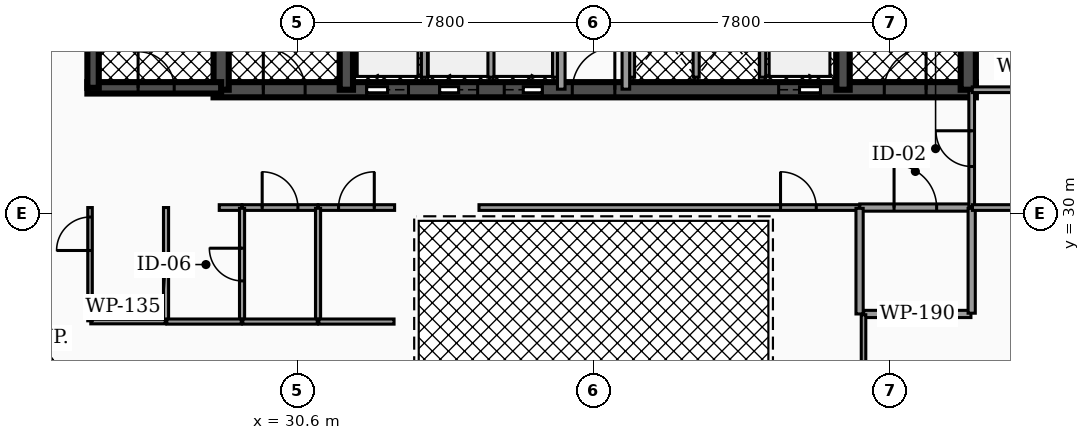
"""IFC4 building model, lengths in metres.
Left out: names, types, materials, properties, quantities, classifications, styles, units other than length and angle.
Written with IfcOpenShell. Run it as: python <this file> out.ifc"""

import sys

from ifc_helpers import new_model, si_unit, direction, frame, frame_2d, origin, place, context, subcontext, project, spatial, rectangle, extrude, element, fill, save


model = new_model("IFC4")
c1 = context("Model", 3, precision=1e-05, world=origin(), true_north=direction((0.0, 1.0)))
c2 = subcontext(c1, "Body", "Model", "MODEL_VIEW")
j1 = project(units=[si_unit("LENGTHUNIT", "METRE"), si_unit("PLANEANGLEUNIT", "RADIAN")], contexts=[c1])
p1 = place(None, origin())
s1 = spatial("IfcSite", under=j1, at=p1, CompositionType="ELEMENT")
p2 = place(p1, origin())
s2 = spatial("IfcBuilding", under=s1, at=p2, CompositionType="ELEMENT")
p3 = place(p2, frame((0.0, 0.0, 157.08)))
s3 = spatial("IfcBuildingStorey", under=s2, at=p3, CompositionType="ELEMENT", Elevation=157.08)
p4 = place(p3, frame((28.4, 33.25, 0.0), z_axis=(0.0, 0.0, 1.0), x_axis=(1.0, 0.0, 0.0)))
e1 = element("IfcWall", 1, at=p4, inside=s3, PredefinedType="SHEAR", context=c2, shape_type="SweptSolid", body=[
    extrude(rectangle(XDim=20.06, YDim=0.4, at=frame_2d((10.03, 0.0))), origin(), (0.0, 0.0, 1.0), 3.5),
])
p5 = place(p4, frame((4.03, 0.0, 0.0)))
e2 = element("IfcOpeningElement", 2, at=p5, cuts=e1, PredefinedType="OPENING", context=c2, shape_type="SweptSolid", body=[
    extrude(rectangle(XDim=1.1, YDim=2.15, at=frame_2d((0.55, 1.075))), frame((0.0, 0.21, 0.0), z_axis=(0.0, -1.0, 0.0), x_axis=(1.0, 0.0, 0.0)), (0.0, 0.0, 1.0), 0.42),
])
p6 = place(p4, frame((14.87, 0.0, 0.0)))
e3 = element("IfcOpeningElement", 3, at=p6, cuts=e1, PredefinedType="OPENING", context=c2, shape_type="SweptSolid", body=[
    extrude(rectangle(XDim=1.1, YDim=2.15, at=frame_2d((0.55, 1.075))), frame((0.0, 0.21, 0.0), z_axis=(0.0, -1.0, 0.0), x_axis=(1.0, 0.0, 0.0)), (0.0, 0.0, 1.0), 0.42),
])
p7 = place(p4, frame((5.95, 0.0, 0.0)))
e4 = element("IfcOpeningElement", 4, at=p7, cuts=e1, PredefinedType="OPENING", context=c2, shape_type="SweptSolid", body=[
    extrude(rectangle(XDim=1.0, YDim=2.1, at=frame_2d((0.5, 1.05))), frame((0.0, 0.21, 0.0), z_axis=(0.0, -1.0, 0.0), x_axis=(1.0, 0.0, 0.0)), (0.0, 0.0, 1.0), 0.42),
])
p8 = place(p4, frame((7.65, 0.0, 0.0)))
e5 = element("IfcOpeningElement", 5, at=p8, cuts=e1, PredefinedType="OPENING", context=c2, shape_type="SweptSolid", body=[
    extrude(rectangle(XDim=1.0, YDim=2.1, at=frame_2d((0.5, 1.05))), frame((0.0, 0.21, 0.0), z_axis=(0.0, -1.0, 0.0), x_axis=(1.0, 0.0, 0.0)), (0.0, 0.0, 1.0), 0.42),
])
p9 = place(p4, frame((1.31, 0.0, 0.0)))
e6 = element("IfcOpeningElement", 6, at=p9, cuts=e1, PredefinedType="OPENING", context=c2, shape_type="SweptSolid", body=[
    extrude(rectangle(XDim=1.1, YDim=2.2, at=frame_2d((0.55, 1.1))), frame((0.0, 0.21, 0.0), z_axis=(0.0, -1.0, 0.0), x_axis=(1.0, 0.0, 0.0)), (0.0, 0.0, 1.0), 0.42),
])
p10 = place(p4, frame((9.44, 0.0, 0.0)))
e7 = element("IfcOpeningElement", 7, at=p10, cuts=e1, PredefinedType="OPENING", context=c2, shape_type="SweptSolid", body=[
    extrude(rectangle(XDim=1.12, YDim=2.05, at=frame_2d((0.56, 1.025))), frame((0.0, 0.21, 0.0), z_axis=(0.0, -1.0, 0.0), x_axis=(1.0, 0.0, 0.0)), (0.0, 0.0, 1.0), 0.42),
])
p11 = place(p4, frame((17.65, 0.0, 0.0)))
e8 = element("IfcOpeningElement", 8, at=p11, cuts=e1, PredefinedType="OPENING", context=c2, shape_type="SweptSolid", body=[
    extrude(rectangle(XDim=1.1, YDim=2.2, at=frame_2d((0.55, 1.1))), frame((0.0, 0.21, 0.0), z_axis=(0.0, -1.0, 0.0), x_axis=(1.0, 0.0, 0.0)), (0.0, 0.0, 1.0), 0.42),
])
p12 = place(p3, frame((28.6, 33.25, 0.0), z_axis=(0.0, 0.0, 1.0), x_axis=(0.0, 1.0, 0.0)))
e9 = element("IfcWall", 9, at=p12, inside=s3, PredefinedType="SHEAR", context=c2, shape_type="SweptSolid", body=[
    extrude(rectangle(XDim=10.2, YDim=0.4, at=frame_2d((5.1, 0.0))), origin(), (0.0, 0.0, 1.0), 3.5),
])
for number, where, z_axis, x_axis in (
    (10, (31.895, 33.25, 0.0), (0.0, 0.0, 1.0), (0.0, 1.0, 0.0)),
    (11, (44.965, 33.25, 0.0), (0.0, 0.0, 1.0), (0.0, 1.0, 0.0)),
):
    element("IfcWall", number, at=place(p3, frame(where, z_axis=z_axis, x_axis=x_axis)), inside=s3, PredefinedType="SHEAR", context=c2, shape_type="SweptSolid", body=[
        extrude(rectangle(XDim=10.2, YDim=0.35, at=frame_2d((5.1, 0.0))), origin(), (0.0, 0.0, 1.0), 3.5),
    ])
p13 = place(p3, frame((48.26, 33.25, 0.0), z_axis=(0.0, 0.0, 1.0), x_axis=(0.0, 1.0, 0.0)))
e12 = element("IfcWall", 12, at=p13, inside=s3, PredefinedType="SHEAR", context=c2, shape_type="SweptSolid", body=[
    extrude(rectangle(XDim=10.2, YDim=0.4, at=frame_2d((5.1, 0.0))), origin(), (0.0, 0.0, 1.0), 3.5),
])
p14 = place(p3, frame((25.08, 33.3, 0.0), z_axis=(0.0, 0.0, 1.0), x_axis=(1.0, 0.0, 0.0)))
e13 = element("IfcWall", 13, at=p14, inside=s3, PredefinedType="SHEAR", context=c2, shape_type="SweptSolid", body=[
    extrude(rectangle(XDim=3.52, YDim=0.3, at=frame_2d((1.76, 0.0))), origin(), (0.0, 0.0, 1.0), 3.5),
])
p15 = place(p14, frame((1.335, 0.0, 0.0)))
e14 = element("IfcOpeningElement", 14, at=p15, cuts=e13, PredefinedType="OPENING", context=c2, shape_type="SweptSolid", body=[
    extrude(rectangle(XDim=0.95, YDim=2.2, at=frame_2d((0.475, 1.1))), frame((0.0, 0.16, 0.0), z_axis=(0.0, -1.0, 0.0), x_axis=(1.0, 0.0, 0.0)), (0.0, 0.0, 1.0), 0.32),
])
p16 = place(p3, frame((25.23, 33.3, 0.0), z_axis=(0.0, 0.0, 1.0), x_axis=(0.0, 1.0, 0.0)))
e15 = element("IfcWall", 15, at=p16, inside=s3, PredefinedType="SHEAR", context=c2, shape_type="SweptSolid", body=[
    extrude(rectangle(XDim=7.6, YDim=0.3, at=frame_2d((3.8, 0.0))), origin(), (0.0, 0.0, 1.0), 3.5),
])
for number, where, z_axis, x_axis in (
    (16, (33.95, 33.58, 0.0), (0.0, 0.0, 1.0), (0.0, 1.0, 0.0)),
    (17, (42.85, 33.58, 0.0), (0.0, 0.0, 1.0), (0.0, 1.0, 0.0)),
):
    element("IfcWall", number, at=place(p3, frame(where, z_axis=z_axis, x_axis=x_axis)), inside=s3, PredefinedType="SOLIDWALL", context=c2, shape_type="SweptSolid", body=[
        extrude(rectangle(XDim=2.45, YDim=0.16, at=frame_2d((1.225, 0.0))), origin(), (0.0, 0.0, 1.0), 2.472),
    ])
for number, where, z_axis, x_axis in (
    (18, (35.7, 33.58, 0.0), (0.0, 0.0, 1.0), (0.0, 1.0, 0.0)),
    (19, (37.4, 33.58, 0.0), (0.0, 0.0, 1.0), (0.0, 1.0, 0.0)),
    (20, (39.4, 33.58, 0.0), (0.0, 0.0, 1.0), (0.0, 1.0, 0.0)),
    (21, (41.1, 33.58, 0.0), (0.0, 0.0, 1.0), (0.0, 1.0, 0.0)),
):
    element("IfcWall", number, at=place(p3, frame(where, z_axis=z_axis, x_axis=x_axis)), inside=s3, PredefinedType="SOLIDWALL", context=c2, shape_type="SweptSolid", body=[
        extrude(rectangle(XDim=2.25, YDim=0.16, at=frame_2d((1.125, 0.0))), origin(), (0.0, 0.0, 1.0), 2.472),
    ])
p17 = place(p3, frame((37.55, 33.265, 0.0), z_axis=(0.0, 0.0, 1.0), x_axis=(0.0, 1.0, 0.0)))
e22 = element("IfcWall", 22, at=p17, inside=s3, PredefinedType="PARTITIONING", context=c2, shape_type="SweptSolid", body=[
    extrude(rectangle(XDim=4.265, YDim=0.2, at=frame_2d((2.133, 0.0))), origin(), (0.0, 0.0, 1.0), 2.457),
])
p18 = place(p17, frame((3.093, 0.0, 0.0)))
e23 = element("IfcOpeningElement", 23, at=p18, cuts=e22, PredefinedType="OPENING", context=c2, shape_type="SweptSolid", body=[
    extrude(rectangle(XDim=0.88, YDim=2.05, at=frame_2d((0.44, 1.025))), frame((0.0, 0.11, 0.0), z_axis=(0.0, -1.0, 0.0), x_axis=(1.0, 0.0, 0.0)), (0.0, 0.0, 1.0), 0.22),
])
p19 = place(p3, frame((39.25, 33.265, 0.0), z_axis=(0.0, 0.0, 1.0), x_axis=(0.0, 1.0, 0.0)))
e24 = element("IfcWall", 24, at=p19, inside=s3, PredefinedType="PARTITIONING", context=c2, shape_type="SweptSolid", body=[
    extrude(rectangle(XDim=4.265, YDim=0.2, at=frame_2d((2.133, 0.0))), origin(), (0.0, 0.0, 1.0), 2.457),
])
p20 = place(p19, frame((3.093, 0.0, 0.0)))
e25 = element("IfcOpeningElement", 25, at=p20, cuts=e24, PredefinedType="OPENING", context=c2, shape_type="SweptSolid", body=[
    extrude(rectangle(XDim=0.88, YDim=2.05, at=frame_2d((0.44, 1.025))), frame((0.0, 0.11, 0.0), z_axis=(0.0, -1.0, 0.0), x_axis=(1.0, 0.0, 0.0)), (0.0, 0.0, 1.0), 0.22),
])
p21 = place(p3, frame((45.405, 30.15, 0.0), z_axis=(0.0, 0.0, 1.0), x_axis=(1.0, 0.0, 0.0)))
e26 = element("IfcWall", 26, at=p21, inside=s3, PredefinedType="PARTITIONING", context=c2, shape_type="SweptSolid", body=[
    extrude(rectangle(XDim=2.925, YDim=0.19, at=frame_2d((1.462, 0.0))), origin(), (0.0, 0.0, 1.0), 2.457),
])
p22 = place(p21, frame((0.903, 0.0, 0.0)))
e27 = element("IfcOpeningElement", 27, at=p22, cuts=e26, PredefinedType="OPENING", context=c2, shape_type="SweptSolid", body=[
    extrude(rectangle(XDim=1.12, YDim=2.05, at=frame_2d((0.56, 1.025))), frame((0.0, 0.105, 0.0), z_axis=(0.0, -1.0, 0.0), x_axis=(1.0, 0.0, 0.0)), (0.0, 0.0, 1.0), 0.21),
])
p23 = place(p3, frame((48.35, 30.17, 0.0), z_axis=(0.0, 0.0, 1.0), x_axis=(0.0, 1.0, 0.0)))
e28 = element("IfcWall", 28, at=p23, inside=s3, PredefinedType="PARTITIONING", context=c2, shape_type="SweptSolid", body=[
    extrude(rectangle(XDim=3.06, YDim=0.15, at=frame_2d((1.53, 0.0))), origin(), (0.0, 0.0, 1.0), 2.457),
])
p24 = place(p23, frame((1.06, 0.0, 0.0)))
e29 = element("IfcOpeningElement", 29, at=p24, cuts=e28, PredefinedType="OPENING", context=c2, shape_type="SweptSolid", body=[
    extrude(rectangle(XDim=0.94, YDim=2.05, at=frame_2d((0.47, 1.025))), frame((0.0, 0.085, 0.0), z_axis=(0.0, -1.0, 0.0), x_axis=(1.0, 0.0, 0.0)), (0.0, 0.0, 1.0), 0.17),
])
p25 = place(p3, frame((28.55, 30.15, 0.0), z_axis=(0.0, 0.0, 1.0), x_axis=(1.0, 0.0, 0.0)))
e30 = element("IfcWall", 30, at=p25, inside=s3, PredefinedType="PARTITIONING", context=c2, shape_type="SweptSolid", body=[
    extrude(rectangle(XDim=0.595, YDim=0.15, at=frame_2d((0.297, 0.0))), origin(), (0.0, 0.0, 1.0), 2.457),
])
p26 = place(p3, frame((29.155, 30.15, 0.0), z_axis=(0.0, 0.0, 1.0), x_axis=(1.0, 0.0, 0.0)))
e31 = element("IfcWall", 31, at=p26, inside=s3, PredefinedType="PARTITIONING", context=c2, shape_type="SweptSolid", body=[
    extrude(rectangle(XDim=1.99, YDim=0.15, at=frame_2d((0.995, 0.0))), origin(), (0.0, 0.0, 1.0), 2.457),
])
p27 = place(p26, frame((0.525, 0.0, 0.0)))
e32 = element("IfcOpeningElement", 32, at=p27, cuts=e31, PredefinedType="OPENING", context=c2, shape_type="SweptSolid", body=[
    extrude(rectangle(XDim=0.94, YDim=2.05, at=frame_2d((0.47, 1.025))), frame((0.0, 0.085, 0.0), z_axis=(0.0, -1.0, 0.0), x_axis=(1.0, 0.0, 0.0)), (0.0, 0.0, 1.0), 0.17),
])
p28 = place(p3, frame((31.155, 30.15, 0.0), z_axis=(0.0, 0.0, 1.0), x_axis=(1.0, 0.0, 0.0)))
e33 = element("IfcWall", 33, at=p28, inside=s3, PredefinedType="PARTITIONING", context=c2, shape_type="SweptSolid", body=[
    extrude(rectangle(XDim=2.01, YDim=0.15, at=frame_2d((1.005, 0.0))), origin(), (0.0, 0.0, 1.0), 2.457),
])
p29 = place(p28, frame((0.535, 0.0, 0.0)))
e34 = element("IfcOpeningElement", 34, at=p29, cuts=e33, PredefinedType="OPENING", context=c2, shape_type="SweptSolid", body=[
    extrude(rectangle(XDim=0.94, YDim=2.05, at=frame_2d((0.47, 1.025))), frame((0.0, 0.085, 0.0), z_axis=(0.0, -1.0, 0.0), x_axis=(1.0, 0.0, 0.0)), (0.0, 0.0, 1.0), 0.17),
])
p30 = place(p3, frame((35.385, 30.15, 0.0), z_axis=(0.0, 0.0, 1.0), x_axis=(1.0, 0.0, 0.0)))
e35 = element("IfcWall", 35, at=p30, inside=s3, PredefinedType="PARTITIONING", context=c2, shape_type="SweptSolid", body=[
    extrude(rectangle(XDim=10.01, YDim=0.15, at=frame_2d((5.005, 0.0))), origin(), (0.0, 0.0, 1.0), 2.457),
])
p31 = place(p30, frame((7.935, 0.0, 0.0)))
e36 = element("IfcOpeningElement", 36, at=p31, cuts=e35, PredefinedType="OPENING", context=c2, shape_type="SweptSolid", body=[
    extrude(rectangle(XDim=0.94, YDim=2.05, at=frame_2d((0.47, 1.025))), frame((0.0, 0.085, 0.0), z_axis=(0.0, -1.0, 0.0), x_axis=(1.0, 0.0, 0.0)), (0.0, 0.0, 1.0), 0.17),
])
p32 = place(p3, frame((45.509, 27.35, 0.0), z_axis=(0.0, 0.0, 1.0), x_axis=(1.0, 0.0, 0.0)))
e37 = element("IfcWall", 37, at=p32, inside=s3, PredefinedType="PARTITIONING", context=c2, shape_type="SweptSolid", body=[
    extrude(rectangle(XDim=2.821, YDim=0.19, at=frame_2d((1.411, 0.0))), origin(), (0.0, 0.0, 1.0), 2.457),
])
p33 = place(p3, frame((48.35, 27.37, 0.0), z_axis=(0.0, 0.0, 1.0), x_axis=(0.0, 1.0, 0.0)))
e38 = element("IfcWall", 38, at=p33, inside=s3, PredefinedType="PARTITIONING", context=c2, shape_type="SweptSolid", body=[
    extrude(rectangle(XDim=2.76, YDim=0.19, at=frame_2d((1.38, 0.0))), origin(), (0.0, 0.0, 1.0), 2.457),
])
p34 = place(p3, frame((45.4, 27.35, 0.0), z_axis=(0.0, 0.0, 1.0), x_axis=(0.0, 1.0, 0.0)))
e39 = element("IfcWall", 39, at=p34, inside=s3, PredefinedType="PARTITIONING", context=c2, shape_type="SweptSolid", body=[
    extrude(rectangle(XDim=2.78, YDim=0.19, at=frame_2d((1.39, 0.0))), origin(), (0.0, 0.0, 1.0), 2.457),
])
p35 = place(p3, frame((48.37, 30.15, 0.0), z_axis=(0.0, 0.0, 1.0), x_axis=(1.0, 0.0, 0.0)))
e40 = element("IfcWall", 40, at=p35, inside=s3, PredefinedType="PARTITIONING", context=c2, shape_type="SweptSolid", body=[
    extrude(rectangle(XDim=3.26, YDim=0.15, at=frame_2d((1.63, 0.0))), origin(), (0.0, 0.0, 1.0), 2.457),
])
p36 = place(p35, frame((1.16, 0.0, 0.0)))
e41 = element("IfcOpeningElement", 41, at=p36, cuts=e40, PredefinedType="OPENING", context=c2, shape_type="SweptSolid", body=[
    extrude(rectangle(XDim=0.94, YDim=2.05, at=frame_2d((0.47, 1.025))), frame((0.0, 0.085, 0.0), z_axis=(0.0, -1.0, 0.0), x_axis=(1.0, 0.0, 0.0)), (0.0, 0.0, 1.0), 0.17),
])
p37 = place(p3, frame((48.365, 33.25, 0.0), z_axis=(0.0, 0.0, 1.0), x_axis=(1.0, 0.0, 0.0)))
e42 = element("IfcWall", 42, at=p37, inside=s3, PredefinedType="PARTITIONING", context=c2, shape_type="SweptSolid", body=[
    extrude(rectangle(XDim=3.265, YDim=0.15, at=frame_2d((1.632, 0.0))), origin(), (0.0, 0.0, 1.0), 2.457),
])
p38 = place(p3, frame((27.15, 27.17, 0.0), z_axis=(0.0, 0.0, 1.0), x_axis=(0.0, 1.0, 0.0)))
e43 = element("IfcWall", 43, at=p38, inside=s3, PredefinedType="PARTITIONING", context=c2, shape_type="SweptSolid", body=[
    extrude(rectangle(XDim=2.98, YDim=0.135, at=frame_2d((1.49, 0.0))), origin(), (0.0, 0.0, 1.0), 2.457),
])
p39 = place(p3, frame((25.17, 27.15, 0.0), z_axis=(0.0, 0.0, 1.0), x_axis=(1.0, 0.0, 0.0)))
e44 = element("IfcWall", 44, at=p39, inside=s3, PredefinedType="PARTITIONING", context=c2, shape_type="SweptSolid", body=[
    extrude(rectangle(XDim=1.96, YDim=0.12, at=frame_2d((0.98, 0.0))), origin(), (0.0, 0.0, 1.0), 2.457),
])
p40 = place(p3, frame((25.15, 27.17, 0.0), z_axis=(0.0, 0.0, 1.0), x_axis=(0.0, 1.0, 0.0)))
e45 = element("IfcWall", 45, at=p40, inside=s3, PredefinedType="PARTITIONING", context=c2, shape_type="SweptSolid", body=[
    extrude(rectangle(XDim=2.98, YDim=0.12, at=frame_2d((1.49, 0.0))), origin(), (0.0, 0.0, 1.0), 2.457),
])
p41 = place(p40, frame((1.85, 0.0, 0.0)))
e46 = element("IfcOpeningElement", 46, at=p41, cuts=e45, PredefinedType="OPENING", context=c2, shape_type="SweptSolid", body=[
    extrude(rectangle(XDim=0.88, YDim=2.05, at=frame_2d((0.44, 1.025))), frame((0.0, 0.07, 0.0), z_axis=(0.0, -1.0, 0.0), x_axis=(1.0, 0.0, 0.0)), (0.0, 0.0, 1.0), 0.14),
])
p42 = place(p3, frame((29.15, 27.17, 0.0), z_axis=(0.0, 0.0, 1.0), x_axis=(0.0, 1.0, 0.0)))
e47 = element("IfcWall", 47, at=p42, inside=s3, PredefinedType="PARTITIONING", context=c2, shape_type="SweptSolid", body=[
    extrude(rectangle(XDim=2.96, YDim=0.135, at=frame_2d((1.48, 0.0))), origin(), (0.0, 0.0, 1.0), 2.457),
])
p43 = place(p42, frame((1.05, 0.0, 0.0)))
e48 = element("IfcOpeningElement", 48, at=p43, cuts=e47, PredefinedType="OPENING", context=c2, shape_type="SweptSolid", body=[
    extrude(rectangle(XDim=0.86, YDim=2.05, at=frame_2d((0.43, 1.025))), frame((0.0, 0.077, 0.0), z_axis=(0.0, -1.0, 0.0), x_axis=(1.0, 0.0, 0.0)), (0.0, 0.0, 1.0), 0.155),
])
p44 = place(p3, frame((27.17, 27.15, 0.0), z_axis=(0.0, 0.0, 1.0), x_axis=(1.0, 0.0, 0.0)))
e49 = element("IfcWall", 49, at=p44, inside=s3, PredefinedType="PARTITIONING", context=c2, shape_type="SweptSolid", body=[
    extrude(rectangle(XDim=1.96, YDim=0.135, at=frame_2d((0.98, 0.0))), origin(), (0.0, 0.0, 1.0), 2.457),
])
p45 = place(p3, frame((31.15, 27.17, 0.0), z_axis=(0.0, 0.0, 1.0), x_axis=(0.0, 1.0, 0.0)))
e50 = element("IfcWall", 50, at=p45, inside=s3, PredefinedType="PARTITIONING", context=c2, shape_type="SweptSolid", body=[
    extrude(rectangle(XDim=2.96, YDim=0.135, at=frame_2d((1.48, 0.0))), origin(), (0.0, 0.0, 1.0), 2.457),
])
p46 = place(p3, frame((29.17, 27.15, 0.0), z_axis=(0.0, 0.0, 1.0), x_axis=(1.0, 0.0, 0.0)))
e51 = element("IfcWall", 51, at=p46, inside=s3, PredefinedType="PARTITIONING", context=c2, shape_type="SweptSolid", body=[
    extrude(rectangle(XDim=1.96, YDim=0.135, at=frame_2d((0.98, 0.0))), origin(), (0.0, 0.0, 1.0), 2.457),
])
p47 = place(p3, frame((31.17, 27.15, 0.0), z_axis=(0.0, 0.0, 1.0), x_axis=(1.0, 0.0, 0.0)))
e52 = element("IfcWall", 52, at=p47, inside=s3, PredefinedType="PARTITIONING", context=c2, shape_type="SweptSolid", body=[
    extrude(rectangle(XDim=1.98, YDim=0.135, at=frame_2d((0.99, 0.0))), origin(), (0.0, 0.0, 1.0), 2.457),
])
p48 = place(p3, frame((45.504, 17.738, 0.0), z_axis=(0.0, 0.0, 1.0), x_axis=(0.0, 1.0, 0.0)))
e53 = element("IfcWall", 53, at=p48, inside=s3, PredefinedType="PARTITIONING", context=c2, shape_type="SweptSolid", body=[
    extrude(rectangle(XDim=9.592, YDim=0.12, at=frame_2d((4.796, 0.0))), origin(), (0.0, 0.0, 1.0), 2.457),
])
p49 = place(p5, origin())
e54 = element("IfcDoor", 54, at=p49, inside=s3, OperationType="SLIDING_TO_LEFT", PredefinedType="DOOR", context=c2, shape_type="SweptSolid", body=[
    extrude(rectangle(XDim=1.1, YDim=2.15, at=frame_2d((0.55, 1.075))), frame((0.0, 0.025, 0.0), z_axis=(0.0, -1.0, 0.0), x_axis=(1.0, 0.0, 0.0)), (0.0, 0.0, 1.0), 0.05),
])
fill(e2, e54)
p50 = place(p6, origin())
e55 = element("IfcDoor", 55, at=p50, inside=s3, OperationType="SLIDING_TO_RIGHT", PredefinedType="DOOR", context=c2, shape_type="SweptSolid", body=[
    extrude(rectangle(XDim=1.1, YDim=2.15, at=frame_2d((0.55, 1.075))), frame((0.0, 0.025, 0.0), z_axis=(0.0, -1.0, 0.0), x_axis=(1.0, 0.0, 0.0)), (0.0, 0.0, 1.0), 0.05),
])
fill(e3, e55)
p51 = place(p7, origin())
e56 = element("IfcDoor", 56, at=p51, inside=s3, OperationType="SLIDING_TO_LEFT", PredefinedType="DOOR", context=c2, shape_type="SweptSolid", body=[
    extrude(rectangle(XDim=1.0, YDim=2.1, at=frame_2d((0.5, 1.05))), frame((0.0, 0.025, 0.0), z_axis=(0.0, -1.0, 0.0), x_axis=(1.0, 0.0, 0.0)), (0.0, 0.0, 1.0), 0.05),
])
fill(e4, e56)
p52 = place(p8, origin())
e57 = element("IfcDoor", 57, at=p52, inside=s3, OperationType="SLIDING_TO_RIGHT", PredefinedType="DOOR", context=c2, shape_type="SweptSolid", body=[
    extrude(rectangle(XDim=1.0, YDim=2.1, at=frame_2d((0.5, 1.05))), frame((0.0, 0.025, 0.0), z_axis=(0.0, -1.0, 0.0), x_axis=(1.0, 0.0, 0.0)), (0.0, 0.0, 1.0), 0.05),
])
fill(e5, e57)
p53 = place(p9, origin())
e58 = element("IfcDoor", 58, at=p53, inside=s3, OperationType="SINGLE_SWING_LEFT", PredefinedType="DOOR", context=c2, shape_type="SweptSolid", body=[
    extrude(rectangle(XDim=1.1, YDim=2.2, at=frame_2d((0.55, 1.1))), frame((0.0, 0.025, 0.0), z_axis=(0.0, -1.0, 0.0), x_axis=(1.0, 0.0, 0.0)), (0.0, 0.0, 1.0), 0.05),
])
fill(e6, e58)
p54 = place(p10, origin())
e59 = element("IfcDoor", 59, at=p54, inside=s3, OperationType="SINGLE_SWING_RIGHT", PredefinedType="DOOR", context=c2, shape_type="SweptSolid", body=[
    extrude(rectangle(XDim=1.12, YDim=2.05, at=frame_2d((0.56, 1.025))), frame((0.0, 0.025, 0.0), z_axis=(0.0, -1.0, 0.0), x_axis=(1.0, 0.0, 0.0)), (0.0, 0.0, 1.0), 0.05),
])
fill(e7, e59)
p55 = place(p11, origin())
e60 = element("IfcDoor", 60, at=p55, inside=s3, OperationType="SINGLE_SWING_RIGHT", PredefinedType="DOOR", context=c2, shape_type="SweptSolid", body=[
    extrude(rectangle(XDim=1.1, YDim=2.2, at=frame_2d((0.55, 1.1))), frame((0.0, 0.025, 0.0), z_axis=(0.0, -1.0, 0.0), x_axis=(1.0, 0.0, 0.0)), (0.0, 0.0, 1.0), 0.05),
])
fill(e8, e60)
p56 = place(p15, origin())
e61 = element("IfcDoor", 61, at=p56, inside=s3, OperationType="SINGLE_SWING_LEFT", PredefinedType="DOOR", context=c2, shape_type="SweptSolid", body=[
    extrude(rectangle(XDim=0.95, YDim=2.2, at=frame_2d((0.475, 1.1))), frame((0.0, 0.025, 0.0), z_axis=(0.0, -1.0, 0.0), x_axis=(1.0, 0.0, 0.0)), (0.0, 0.0, 1.0), 0.05),
])
fill(e14, e61)
p57 = place(p22, origin())
e62 = element("IfcDoor", 62, at=p57, inside=s3, OperationType="SINGLE_SWING_LEFT", PredefinedType="DOOR", context=c2, shape_type="SweptSolid", body=[
    extrude(rectangle(XDim=1.12, YDim=2.05, at=frame_2d((0.56, 1.025))), frame((0.0, 0.025, 0.0), z_axis=(0.0, -1.0, 0.0), x_axis=(1.0, 0.0, 0.0)), (0.0, 0.0, 1.0), 0.05),
])
fill(e27, e62)
p58 = place(p24, origin())
e63 = element("IfcDoor", 63, at=p58, inside=s3, OperationType="SINGLE_SWING_RIGHT", PredefinedType="DOOR", context=c2, shape_type="SweptSolid", body=[
    extrude(rectangle(XDim=0.94, YDim=2.05, at=frame_2d((0.47, 1.025))), frame((0.0, 0.025, 0.0), z_axis=(0.0, -1.0, 0.0), x_axis=(1.0, 0.0, 0.0)), (0.0, 0.0, 1.0), 0.05),
])
fill(e29, e63)
p59 = place(p27, origin())
e64 = element("IfcDoor", 64, at=p59, inside=s3, OperationType="SINGLE_SWING_LEFT", PredefinedType="DOOR", context=c2, shape_type="SweptSolid", body=[
    extrude(rectangle(XDim=0.94, YDim=2.05, at=frame_2d((0.47, 1.025))), frame((0.0, 0.025, 0.0), z_axis=(0.0, -1.0, 0.0), x_axis=(1.0, 0.0, 0.0)), (0.0, 0.0, 1.0), 0.05),
])
fill(e32, e64)
p60 = place(p29, origin())
e65 = element("IfcDoor", 65, at=p60, inside=s3, OperationType="SINGLE_SWING_RIGHT", PredefinedType="DOOR", context=c2, shape_type="SweptSolid", body=[
    extrude(rectangle(XDim=0.94, YDim=2.05, at=frame_2d((0.47, 1.025))), frame((0.0, 0.025, 0.0), z_axis=(0.0, -1.0, 0.0), x_axis=(1.0, 0.0, 0.0)), (0.0, 0.0, 1.0), 0.05),
])
fill(e34, e65)
p61 = place(p31, origin())
e66 = element("IfcDoor", 66, at=p61, inside=s3, OperationType="SINGLE_SWING_LEFT", PredefinedType="DOOR", context=c2, shape_type="SweptSolid", body=[
    extrude(rectangle(XDim=0.94, YDim=2.05, at=frame_2d((0.47, 1.025))), frame((0.0, 0.025, 0.0), z_axis=(0.0, -1.0, 0.0), x_axis=(1.0, 0.0, 0.0)), (0.0, 0.0, 1.0), 0.05),
])
fill(e36, e66)
p62 = place(p41, origin())
e67 = element("IfcDoor", 67, at=p62, inside=s3, OperationType="SINGLE_SWING_LEFT", PredefinedType="DOOR", context=c2, shape_type="SweptSolid", body=[
    extrude(rectangle(XDim=0.88, YDim=2.05, at=frame_2d((0.44, 1.025))), frame((0.0, 0.025, 0.0), z_axis=(0.0, -1.0, 0.0), x_axis=(1.0, 0.0, 0.0)), (0.0, 0.0, 1.0), 0.05),
])
fill(e46, e67)
p63 = place(p43, origin())
e68 = element("IfcDoor", 68, at=p63, inside=s3, OperationType="SINGLE_SWING_RIGHT", PredefinedType="DOOR", context=c2, shape_type="SweptSolid", body=[
    extrude(rectangle(XDim=0.86, YDim=2.05, at=frame_2d((0.43, 1.025))), frame((0.0, 0.025, 0.0), z_axis=(0.0, -1.0, 0.0), x_axis=(1.0, 0.0, 0.0)), (0.0, 0.0, 1.0), 0.05),
])
fill(e48, e68)
save(model, sys.argv[1])
